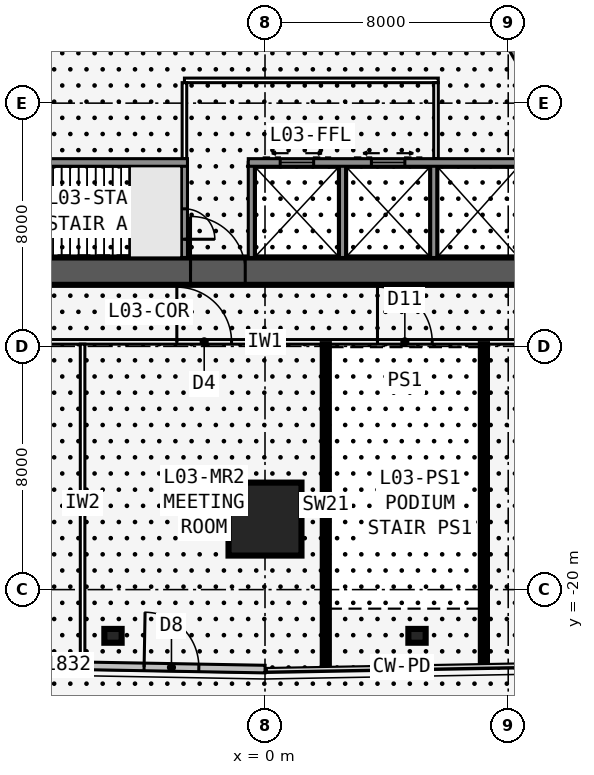
"""IFC4 building model, lengths in metres.
Left out: names, types, materials, properties, quantities, classifications, styles, units other than length and angle.
Written with IfcOpenShell. Run it as: python <this file> out.ifc"""

import sys

from ifc_helpers import new_model, si_unit, direction, frame, frame_2d, origin, origin_2d, place, context, subcontext, project, spatial, rectangle, i_section, extrude, element, fill, save


model = new_model("IFC4")
c1 = context("Model", 3, precision=1e-05, world=origin(), true_north=direction((0.0, 1.0)))
c2 = subcontext(c1, "Body", "Model", "MODEL_VIEW")
j1 = project(units=[si_unit("LENGTHUNIT", "METRE"), si_unit("PLANEANGLEUNIT", "RADIAN")], contexts=[c1])
p1 = place(None, origin())
s1 = spatial("IfcSite", under=j1, at=p1, CompositionType="ELEMENT")
p2 = place(p1, origin())
s2 = spatial("IfcBuilding", under=s1, at=p2, CompositionType="ELEMENT")
p3 = place(p2, frame((0.0, 0.0, 17.5)))
s3 = spatial("IfcBuildingStorey", under=s2, at=p3, CompositionType="ELEMENT", Elevation=17.5)
p4 = place(p3, frame((-16.5, -9.526, 0.0), z_axis=(0.0, 0.0, 1.0), x_axis=(1.0, 0.0, 0.0)))
e1 = element("IfcWall", 1, at=p4, inside=s3, PredefinedType="SHEAR", context=c2, shape_type="SweptSolid", body=[
    extrude(rectangle(XDim=33.0, YDim=0.9, at=frame_2d((16.5, 0.0))), origin(), (0.0, 0.0, 1.0), 5.0),
])
p5 = place(p4, frame((14.05, 0.0, 0.0)))
e2 = element("IfcOpeningElement", 2, at=p5, cuts=e1, PredefinedType="OPENING", context=c2, shape_type="SweptSolid", body=[
    extrude(rectangle(XDim=1.8, YDim=2.13, at=frame_2d((0.9, 1.065))), frame((0.0, 0.46, 0.0), z_axis=(0.0, -1.0, 0.0), x_axis=(1.0, 0.0, 0.0)), (0.0, 0.0, 1.0), 0.92),
])
p6 = place(p3, frame((-10.183, -5.951, 0.0), z_axis=(0.0, 0.0, 1.0), x_axis=(1.0, 0.0, 0.0)))
e3 = element("IfcWall", 3, at=p6, inside=s3, PredefinedType="SOLIDWALL", context=c2, shape_type="SweptSolid", body=[
    extrude(rectangle(XDim=7.633, YDim=0.25, at=frame_2d((3.816, 0.0))), origin(), (0.0, 0.0, 1.0), 4.75),
])
p7 = place(p3, frame((-0.55, -5.951, 0.0), z_axis=(0.0, 0.0, 1.0), x_axis=(1.0, 0.0, 0.0)))
e4 = element("IfcWall", 4, at=p7, inside=s3, PredefinedType="SOLIDWALL", context=c2, shape_type="SweptSolid", body=[
    extrude(rectangle(XDim=10.733, YDim=0.25, at=frame_2d((5.366, 0.0))), origin(), (0.0, 0.0, 1.0), 4.75),
])
p8 = place(p7, frame((9.314, 0.0, 0.0)))
e5 = element("IfcOpeningElement", 5, at=p8, cuts=e4, PredefinedType="OPENING", context=c2, shape_type="SweptSolid", body=[
    extrude(rectangle(XDim=0.9, YDim=2.13, at=frame_2d((0.45, 1.065))), frame((0.0, 0.135, 0.0), z_axis=(0.0, -1.0, 0.0), x_axis=(1.0, 0.0, 0.0)), (0.0, 0.0, 1.0), 0.27),
])
p9 = place(p7, frame((1.05, 0.0, 0.0)))
e6 = element("IfcOpeningElement", 6, at=p9, cuts=e4, PredefinedType="OPENING", context=c2, shape_type="SweptSolid", body=[
    extrude(rectangle(XDim=1.1, YDim=2.13, at=frame_2d((0.55, 1.065))), frame((0.0, 0.135, 0.0), z_axis=(0.0, -1.0, 0.0), x_axis=(1.0, 0.0, 0.0)), (0.0, 0.0, 1.0), 0.27),
])
p10 = place(p7, frame((4.05, 0.0, 0.0)))
e7 = element("IfcOpeningElement", 7, at=p10, cuts=e4, PredefinedType="OPENING", context=c2, shape_type="SweptSolid", body=[
    extrude(rectangle(XDim=1.1, YDim=2.13, at=frame_2d((0.55, 1.065))), frame((0.0, 0.135, 0.0), z_axis=(0.0, -1.0, 0.0), x_axis=(1.0, 0.0, 0.0)), (0.0, 0.0, 1.0), 0.27),
])
p11 = place(p3, frame((-2.65, -5.951, 0.0), z_axis=(0.0, 0.0, 1.0), x_axis=(0.0, -1.0, 0.0)))
e8 = element("IfcWall", 8, at=p11, inside=s3, PredefinedType="SOLIDWALL", context=c2, shape_type="SweptSolid", body=[
    extrude(rectangle(XDim=3.125, YDim=0.2, at=frame_2d((1.562, 0.0))), origin(), (0.0, 0.0, 1.0), 4.75),
])
p12 = place(p11, frame((1.525, 0.0, 0.0)))
e9 = element("IfcOpeningElement", 9, at=p12, cuts=e8, PredefinedType="OPENING", context=c2, shape_type="SweptSolid", body=[
    extrude(rectangle(XDim=1.0, YDim=2.13, at=frame_2d((0.5, 1.065))), frame((0.0, 0.11, 0.0), z_axis=(0.0, -1.0, 0.0), x_axis=(1.0, 0.0, 0.0)), (0.0, 0.0, 1.0), 0.22),
])
for number, where, z_axis, x_axis in (
    (10, (-0.45, -5.951, 0.0), (0.0, 0.0, 1.0), (0.0, -1.0, 0.0)),
    (11, (2.55, -5.951, 0.0), (0.0, 0.0, 1.0), (0.0, -1.0, 0.0)),
    (12, (5.55, -5.951, 0.0), (0.0, 0.0, 1.0), (0.0, -1.0, 0.0)),
):
    element("IfcWall", number, at=place(p3, frame(where, z_axis=z_axis, x_axis=x_axis)), inside=s3, PredefinedType="SOLIDWALL", context=c2, shape_type="SweptSolid", body=[
        extrude(rectangle(XDim=3.125, YDim=0.2, at=frame_2d((1.562, 0.0))), origin(), (0.0, 0.0, 1.0), 4.75),
    ])
p13 = place(p3, frame((16.5, -9.526, 0.0), z_axis=(0.0, 0.0, 1.0), x_axis=(-0.499999749417, 0.866025548458, 0.0)))
e13 = element("IfcWall", 13, at=p13, inside=s3, PredefinedType="SHEAR", context=c2, shape_type="SweptSolid", body=[
    extrude(rectangle(XDim=33.0, YDim=0.9, at=frame_2d((16.5, 0.0))), origin(), (0.0, 0.0, 1.0), 5.0),
])
p14 = place(p13, frame((14.15, 0.0, 0.0)))
e14 = element("IfcOpeningElement", 14, at=p14, cuts=e13, PredefinedType="OPENING", context=c2, shape_type="SweptSolid", body=[
    extrude(rectangle(XDim=1.8, YDim=2.13, at=frame_2d((0.9, 1.065))), frame((0.0, 0.46, 0.0), z_axis=(0.0, -1.0, 0.0), x_axis=(1.0, 0.0, 0.0)), (0.0, 0.0, 1.0), 0.92),
])
p15 = place(p13, frame((12.6, 0.0, 0.0)))
e15 = element("IfcOpeningElement", 15, at=p15, cuts=e13, PredefinedType="OPENING", context=c2, shape_type="SweptSolid", body=[
    extrude(rectangle(XDim=1.0, YDim=2.13, at=frame_2d((0.5, 1.065))), frame((0.0, 0.46, 0.0), z_axis=(0.0, -1.0, 0.0), x_axis=(1.0, 0.0, 0.0)), (0.0, 0.0, 1.0), 0.92),
])
p16 = place(p3, frame((10.245, -5.843, 0.0), z_axis=(0.0, 0.0, 1.0), x_axis=(-0.499993009313, 0.866029439822, 0.0)))
e16 = element("IfcWall", 16, at=p16, inside=s3, PredefinedType="SOLIDWALL", context=c2, shape_type="SweptSolid", body=[
    extrude(rectangle(XDim=7.733, YDim=0.25, at=frame_2d((3.866, 0.0))), origin(), (0.0, 0.0, 1.0), 4.75),
])
p17 = place(p3, frame((0.0, 19.052, 0.0), z_axis=(0.0, 0.0, 1.0), x_axis=(-0.499999749417, -0.866025548458, 0.0)))
e17 = element("IfcWall", 17, at=p17, inside=s3, PredefinedType="SHEAR", context=c2, shape_type="SweptSolid", body=[
    extrude(rectangle(XDim=33.0, YDim=0.9, at=frame_2d((16.5, 0.0))), origin(), (0.0, 0.0, 1.0), 5.0),
])
p18 = place(p17, frame((14.15, 0.0, 0.0)))
e18 = element("IfcOpeningElement", 18, at=p18, cuts=e17, PredefinedType="OPENING", context=c2, shape_type="SweptSolid", body=[
    extrude(rectangle(XDim=1.8, YDim=2.13, at=frame_2d((0.9, 1.065))), frame((0.0, 0.46, 0.0), z_axis=(0.0, -1.0, 0.0), x_axis=(1.0, 0.0, 0.0)), (0.0, 0.0, 1.0), 0.92),
])
p19 = place(p17, frame((12.6, 0.0, 0.0)))
e19 = element("IfcOpeningElement", 19, at=p19, cuts=e17, PredefinedType="OPENING", context=c2, shape_type="SweptSolid", body=[
    extrude(rectangle(XDim=1.0, YDim=2.13, at=frame_2d((0.5, 1.065))), frame((0.0, 0.46, 0.0), z_axis=(0.0, -1.0, 0.0), x_axis=(1.0, 0.0, 0.0)), (0.0, 0.0, 1.0), 0.92),
])
p20 = place(p3, frame((-4.929, 3.365, 0.0), z_axis=(0.0, 0.0, 1.0), x_axis=(-0.499991433582, -0.866030349552, 0.0)))
e20 = element("IfcWall", 20, at=p20, inside=s3, PredefinedType="SOLIDWALL", context=c2, shape_type="SweptSolid", body=[
    extrude(rectangle(XDim=10.633, YDim=0.25, at=frame_2d((5.316, 0.0))), origin(), (0.0, 0.0, 1.0), 4.75),
])
p21 = place(p20, frame((9.164, 0.0, 0.0)))
e21 = element("IfcOpeningElement", 21, at=p21, cuts=e20, PredefinedType="OPENING", context=c2, shape_type="SweptSolid", body=[
    extrude(rectangle(XDim=0.9, YDim=2.13, at=frame_2d((0.45, 1.065))), frame((0.0, 0.135, 0.0), z_axis=(0.0, -1.0, 0.0), x_axis=(1.0, 0.0, 0.0)), (0.0, 0.0, 1.0), 0.27),
])
for number, where, z_axis, x_axis in (
    (22, (-5.0, -21.521, 0.0), (0.0, 0.0, 1.0), (0.0, -1.0, 0.0)),
    (23, (5.0, -21.521, 0.0), (0.0, 0.0, 1.0), (0.0, -1.0, 0.0)),
):
    element("IfcColumn", number, at=place(p3, frame(where, z_axis=z_axis, x_axis=x_axis)), inside=s3, PredefinedType="COLUMN", context=c2, shape_type="SweptSolid", body=[
        extrude(i_section(OverallWidth=0.455, OverallDepth=0.569, WebThickness=0.078, FlangeThickness=0.125, at=origin_2d()), origin(), (0.0, 0.0, 1.0), 5.0),
    ])
p22 = place(p3, frame((0.0, -17.68, 0.0), z_axis=(0.0, 0.0, 1.0), x_axis=(0.0, -1.0, 0.0)))
e24 = element("IfcColumn", 24, at=p22, inside=s3, PredefinedType="COLUMN", context=c2, shape_type="SweptSolid", body=[
    extrude(rectangle(XDim=2.4, YDim=2.4, at=origin_2d()), origin(), (0.0, 0.0, 1.0), 5.0),
])
p23 = place(p3, frame((-8.998, -22.452, 0.0), z_axis=(0.0, 0.0, 1.0), x_axis=(0.999838308644, -0.017982118018, 0.0)))
e25 = element("IfcWall", 25, at=p23, inside=s3, PredefinedType="STANDARD", context=c2, shape_type="SweptSolid", body=[
    extrude(rectangle(XDim=9.001, YDim=0.25, at=frame_2d((4.501, 0.0))), origin(), (0.0, 0.0, 1.0), 4.75),
])
p24 = place(p23, frame((0.671, 0.0, 0.6)))
e26 = element("IfcOpeningElement", 26, at=p24, cuts=e25, PredefinedType="OPENING", context=c2, shape_type="SweptSolid", body=[
    extrude(rectangle(XDim=1.8, YDim=3.2, at=frame_2d((0.9, 1.6))), frame((0.0, 0.135, 0.0), z_axis=(0.0, -1.0, 0.0), x_axis=(1.0, 0.0, 0.0)), (0.0, 0.0, 1.0), 0.27),
])
p25 = place(p23, frame((5.022, 0.0, 0.0)))
e27 = element("IfcOpeningElement", 27, at=p25, cuts=e25, PredefinedType="OPENING", context=c2, shape_type="SweptSolid", body=[
    extrude(rectangle(XDim=1.8, YDim=2.4, at=frame_2d((0.9, 1.2))), frame((0.0, 0.135, 0.0), z_axis=(0.0, -1.0, 0.0), x_axis=(1.0, 0.0, 0.0)), (0.0, 0.0, 1.0), 0.27),
])
p26 = place(p3, frame((-19.527, -11.851, 0.0), z_axis=(0.0, 0.0, 1.0), x_axis=(1.0, 0.0, 0.0)))
e28 = element("IfcWall", 28, at=p26, inside=s3, PredefinedType="PARTITIONING", context=c2, shape_type="SweptSolid", body=[
    extrude(rectangle(XDim=39.054, YDim=0.15, at=frame_2d((19.527, 0.0))), origin(), (0.0, 0.0, 1.0), 4.75),
])
p27 = place(p26, frame((6.013, 0.0, 0.0)))
e29 = element("IfcOpeningElement", 29, at=p27, cuts=e28, PredefinedType="OPENING", context=c2, shape_type="SweptSolid", body=[
    extrude(rectangle(XDim=1.8, YDim=2.13, at=frame_2d((0.9, 1.065))), frame((0.0, 0.085, 0.0), z_axis=(0.0, -1.0, 0.0), x_axis=(1.0, 0.0, 0.0)), (0.0, 0.0, 1.0), 0.17),
])
p28 = place(p26, frame((16.627, 0.0, 0.0)))
e30 = element("IfcOpeningElement", 30, at=p28, cuts=e28, PredefinedType="OPENING", context=c2, shape_type="SweptSolid", body=[
    extrude(rectangle(XDim=1.8, YDim=2.13, at=frame_2d((0.9, 1.065))), frame((0.0, 0.085, 0.0), z_axis=(0.0, -1.0, 0.0), x_axis=(1.0, 0.0, 0.0)), (0.0, 0.0, 1.0), 0.17),
])
p29 = place(p26, frame((23.227, 0.0, 0.0)))
e31 = element("IfcOpeningElement", 31, at=p29, cuts=e28, PredefinedType="OPENING", context=c2, shape_type="SweptSolid", body=[
    extrude(rectangle(XDim=1.8, YDim=2.13, at=frame_2d((0.9, 1.065))), frame((0.0, 0.085, 0.0), z_axis=(0.0, -1.0, 0.0), x_axis=(1.0, 0.0, 0.0)), (0.0, 0.0, 1.0), 0.17),
])
p30 = place(p26, frame((31.841, 0.0, 0.0)))
e32 = element("IfcOpeningElement", 32, at=p30, cuts=e28, PredefinedType="OPENING", context=c2, shape_type="SweptSolid", body=[
    extrude(rectangle(XDim=1.8, YDim=2.13, at=frame_2d((0.9, 1.065))), frame((0.0, 0.085, 0.0), z_axis=(0.0, -1.0, 0.0), x_axis=(1.0, 0.0, 0.0)), (0.0, 0.0, 1.0), 0.17),
])
p31 = place(p3, frame((-6.0, -11.926, 0.0), z_axis=(0.0, 0.0, 1.0), x_axis=(0.0, -1.0, 0.0)))
e33 = element("IfcWall", 33, at=p31, inside=s3, PredefinedType="PARTITIONING", context=c2, shape_type="SweptSolid", body=[
    extrude(rectangle(XDim=10.455, YDim=0.15, at=frame_2d((5.228, 0.0))), origin(), (0.0, 0.0, 1.0), 4.75),
])
p32 = place(p3, frame((2.0, -11.926, 0.0), z_axis=(0.0, 0.0, 1.0), x_axis=(0.0, -1.0, 0.0)))
e34 = element("IfcWall", 34, at=p32, inside=s3, PredefinedType="SHEAR", context=c2, shape_type="SweptSolid", body=[
    extrude(rectangle(XDim=10.596, YDim=0.2, at=frame_2d((5.298, 0.0))), origin(), (0.0, 0.0, 1.0), 5.0),
])
p33 = place(p3, frame((7.2, -11.926, 0.0), z_axis=(0.0, 0.0, 1.0), x_axis=(0.0, -1.0, 0.0)))
e35 = element("IfcWall", 35, at=p33, inside=s3, PredefinedType="SHEAR", context=c2, shape_type="SweptSolid", body=[
    extrude(rectangle(XDim=10.502, YDim=0.2, at=frame_2d((5.251, 0.0))), origin(), (0.0, 0.0, 1.0), 5.0),
])
p34 = place(p3, frame((20.027, -10.985, 0.0), z_axis=(0.0, 0.0, 1.0), x_axis=(-0.500001677587, 0.866024435227, 0.0)))
e36 = element("IfcWall", 36, at=p34, inside=s3, PredefinedType="PARTITIONING", context=c2, shape_type="SweptSolid", body=[
    extrude(rectangle(XDim=39.054, YDim=0.15, at=frame_2d((19.527, 0.0))), origin(), (0.0, 0.0, 1.0), 4.75),
])
p35 = place(p34, frame((10.013, 0.0, 0.0)))
e37 = element("IfcOpeningElement", 37, at=p35, cuts=e36, PredefinedType="OPENING", context=c2, shape_type="SweptSolid", body=[
    extrude(rectangle(XDim=1.8, YDim=2.13, at=frame_2d((0.9, 1.065))), frame((0.0, 0.085, 0.0), z_axis=(0.0, -1.0, 0.0), x_axis=(1.0, 0.0, 0.0)), (0.0, 0.0, 1.0), 0.17),
])
p36 = place(p34, frame((23.227, 0.0, 0.0)))
e38 = element("IfcOpeningElement", 38, at=p36, cuts=e36, PredefinedType="OPENING", context=c2, shape_type="SweptSolid", body=[
    extrude(rectangle(XDim=1.8, YDim=2.13, at=frame_2d((0.9, 1.065))), frame((0.0, 0.085, 0.0), z_axis=(0.0, -1.0, 0.0), x_axis=(1.0, 0.0, 0.0)), (0.0, 0.0, 1.0), 0.17),
])
p37 = place(p34, frame((27.627, 0.0, 0.0)))
e39 = element("IfcOpeningElement", 39, at=p37, cuts=e36, PredefinedType="OPENING", context=c2, shape_type="SweptSolid", body=[
    extrude(rectangle(XDim=1.0, YDim=2.13, at=frame_2d((0.5, 1.065))), frame((0.0, 0.085, 0.0), z_axis=(0.0, -1.0, 0.0), x_axis=(1.0, 0.0, 0.0)), (0.0, 0.0, 1.0), 0.17),
])
p38 = place(p34, frame((30.527, 0.0, 0.0)))
e40 = element("IfcOpeningElement", 40, at=p38, cuts=e36, PredefinedType="OPENING", context=c2, shape_type="SweptSolid", body=[
    extrude(rectangle(XDim=1.0, YDim=2.13, at=frame_2d((0.5, 1.065))), frame((0.0, 0.085, 0.0), z_axis=(0.0, -1.0, 0.0), x_axis=(1.0, 0.0, 0.0)), (0.0, 0.0, 1.0), 0.17),
])
p39 = place(p34, frame((33.277, 0.0, 0.0)))
e41 = element("IfcOpeningElement", 41, at=p39, cuts=e36, PredefinedType="OPENING", context=c2, shape_type="SweptSolid", body=[
    extrude(rectangle(XDim=1.0, YDim=2.13, at=frame_2d((0.5, 1.065))), frame((0.0, 0.085, 0.0), z_axis=(0.0, -1.0, 0.0), x_axis=(1.0, 0.0, 0.0)), (0.0, 0.0, 1.0), 0.17),
])
p40 = place(p34, frame((36.39, 0.0, 0.0)))
e42 = element("IfcOpeningElement", 42, at=p40, cuts=e36, PredefinedType="OPENING", context=c2, shape_type="SweptSolid", body=[
    extrude(rectangle(XDim=1.0, YDim=2.13, at=frame_2d((0.5, 1.065))), frame((0.0, 0.085, 0.0), z_axis=(0.0, -1.0, 0.0), x_axis=(1.0, 0.0, 0.0)), (0.0, 0.0, 1.0), 0.17),
])
p41 = place(p3, frame((-0.5, 22.836, 0.0), z_axis=(0.0, 0.0, 1.0), x_axis=(-0.500001677587, -0.866024435227, 0.0)))
e43 = element("IfcWall", 43, at=p41, inside=s3, PredefinedType="PARTITIONING", context=c2, shape_type="SweptSolid", body=[
    extrude(rectangle(XDim=39.054, YDim=0.15, at=frame_2d((19.527, 0.0))), origin(), (0.0, 0.0, 1.0), 4.75),
])
p42 = place(p41, frame((10.414, 0.0, 0.0)))
e44 = element("IfcOpeningElement", 44, at=p42, cuts=e43, PredefinedType="OPENING", context=c2, shape_type="SweptSolid", body=[
    extrude(rectangle(XDim=1.0, YDim=2.13, at=frame_2d((0.5, 1.065))), frame((0.0, 0.085, 0.0), z_axis=(0.0, -1.0, 0.0), x_axis=(1.0, 0.0, 0.0)), (0.0, 0.0, 1.0), 0.17),
])
p43 = place(p41, frame((23.227, 0.0, 0.0)))
e45 = element("IfcOpeningElement", 45, at=p43, cuts=e43, PredefinedType="OPENING", context=c2, shape_type="SweptSolid", body=[
    extrude(rectangle(XDim=1.8, YDim=2.13, at=frame_2d((0.9, 1.065))), frame((0.0, 0.085, 0.0), z_axis=(0.0, -1.0, 0.0), x_axis=(1.0, 0.0, 0.0)), (0.0, 0.0, 1.0), 0.17),
])
p44 = place(p41, frame((27.627, 0.0, 0.0)))
e46 = element("IfcOpeningElement", 46, at=p44, cuts=e43, PredefinedType="OPENING", context=c2, shape_type="SweptSolid", body=[
    extrude(rectangle(XDim=1.0, YDim=2.13, at=frame_2d((0.5, 1.065))), frame((0.0, 0.085, 0.0), z_axis=(0.0, -1.0, 0.0), x_axis=(1.0, 0.0, 0.0)), (0.0, 0.0, 1.0), 0.17),
])
p45 = place(p41, frame((30.277, 0.0, 0.0)))
e47 = element("IfcOpeningElement", 47, at=p45, cuts=e43, PredefinedType="OPENING", context=c2, shape_type="SweptSolid", body=[
    extrude(rectangle(XDim=1.0, YDim=2.13, at=frame_2d((0.5, 1.065))), frame((0.0, 0.085, 0.0), z_axis=(0.0, -1.0, 0.0), x_axis=(1.0, 0.0, 0.0)), (0.0, 0.0, 1.0), 0.17),
])
p46 = place(p41, frame((34.89, 0.0, 0.0)))
e48 = element("IfcOpeningElement", 48, at=p46, cuts=e43, PredefinedType="OPENING", context=c2, shape_type="SweptSolid", body=[
    extrude(rectangle(XDim=1.0, YDim=2.13, at=frame_2d((0.5, 1.065))), frame((0.0, 0.085, 0.0), z_axis=(0.0, -1.0, 0.0), x_axis=(1.0, 0.0, 0.0)), (0.0, 0.0, 1.0), 0.17),
])
p47 = place(p3, frame((-2.65, -3.251, 0.0), z_axis=(0.0, 0.0, 1.0), x_axis=(1.0, 0.0, 0.0)))
e49 = element("IfcWall", 49, at=p47, inside=s3, PredefinedType="PARTITIONING", context=c2, shape_type="SweptSolid", body=[
    extrude(rectangle(XDim=8.35, YDim=0.15, at=frame_2d((4.175, 0.0))), origin(), (0.0, 0.0, 1.0), 4.75),
])
for number, where, z_axis, x_axis in (
    (50, (-2.65, -5.826, 0.0), (0.0, 0.0, 1.0), (0.0, 1.0, 0.0)),
    (51, (5.625, -5.826, 0.0), (0.0, 0.0, 1.0), (0.0, 1.0, 0.0)),
):
    element("IfcWall", number, at=place(p3, frame(where, z_axis=z_axis, x_axis=x_axis)), inside=s3, PredefinedType="PARTITIONING", context=c2, shape_type="SweptSolid", body=[
        extrude(rectangle(XDim=2.5, YDim=0.15, at=frame_2d((1.25, 0.0))), origin(), (0.0, 0.0, 1.0), 4.75),
    ])
p48 = place(p3, frame((-7.247, -7.576, 0.0), z_axis=(0.0, 0.0, 1.0), x_axis=(1.0, 0.0, 0.0)))
e52 = element("IfcWall", 52, at=p48, inside=s3, PredefinedType="SOLIDWALL", context=c2, shape_type="SweptSolid", body=[
    extrude(rectangle(XDim=2.794, YDim=0.1, at=frame_2d((1.397, 0.0))), origin(), (0.0, 0.0, 1.0), 5.0),
])
p49 = place(p24, origin())
e53 = element("IfcWindow", 53, at=p49, inside=s3, PartitioningType="SINGLE_PANEL", PredefinedType="WINDOW", context=c2, shape_type="SweptSolid", body=[
    extrude(rectangle(XDim=1.8, YDim=3.2, at=frame_2d((0.9, 1.6))), frame((0.0, 0.03, 0.0), z_axis=(0.0, -1.0, 0.0), x_axis=(1.0, 0.0, 0.0)), (0.0, 0.0, 1.0), 0.06),
])
fill(e26, e53)
p50 = place(p25, origin())
e54 = element("IfcDoor", 54, at=p50, inside=s3, OperationType="DOUBLE_DOOR_SINGLE_SWING", PredefinedType="DOOR", context=c2, shape_type="SweptSolid", body=[
    extrude(rectangle(XDim=1.8, YDim=2.4, at=frame_2d((0.9, 1.2))), frame((0.0, 0.025, 0.0), z_axis=(0.0, -1.0, 0.0), x_axis=(1.0, 0.0, 0.0)), (0.0, 0.0, 1.0), 0.05),
])
fill(e27, e54)
p51 = place(p28, origin())
e55 = element("IfcDoor", 55, at=p51, inside=s3, OperationType="DOUBLE_DOOR_SINGLE_SWING", PredefinedType="DOOR", context=c2, shape_type="SweptSolid", body=[
    extrude(rectangle(XDim=1.8, YDim=2.13, at=frame_2d((0.9, 1.065))), frame((0.0, 0.025, 0.0), z_axis=(0.0, -1.0, 0.0), x_axis=(1.0, 0.0, 0.0)), (0.0, 0.0, 1.0), 0.05),
])
fill(e30, e55)
p52 = place(p29, origin())
e56 = element("IfcDoor", 56, at=p52, inside=s3, OperationType="DOUBLE_DOOR_SINGLE_SWING", PredefinedType="DOOR", context=c2, shape_type="SweptSolid", body=[
    extrude(rectangle(XDim=1.8, YDim=2.13, at=frame_2d((0.9, 1.065))), frame((0.0, 0.025, 0.0), z_axis=(0.0, -1.0, 0.0), x_axis=(1.0, 0.0, 0.0)), (0.0, 0.0, 1.0), 0.05),
])
fill(e31, e56)
p53 = place(p5, origin())
e57 = element("IfcDoor", 57, at=p53, inside=s3, OperationType="DOUBLE_DOOR_SINGLE_SWING", PredefinedType="DOOR", context=c2, shape_type="SweptSolid", body=[
    extrude(rectangle(XDim=1.8, YDim=2.13, at=frame_2d((0.9, 1.065))), frame((0.0, 0.025, 0.0), z_axis=(0.0, -1.0, 0.0), x_axis=(1.0, 0.0, 0.0)), (0.0, 0.0, 1.0), 0.05),
])
fill(e2, e57)
p54 = place(p12, origin())
e58 = element("IfcDoor", 58, at=p54, inside=s3, OperationType="SINGLE_SWING_RIGHT", PredefinedType="DOOR", context=c2, shape_type="SweptSolid", body=[
    extrude(rectangle(XDim=1.0, YDim=2.13, at=frame_2d((0.5, 1.065))), frame((0.0, 0.025, 0.0), z_axis=(0.0, -1.0, 0.0), x_axis=(1.0, 0.0, 0.0)), (0.0, 0.0, 1.0), 0.05),
])
fill(e9, e58)
p55 = place(p9, origin())
e59 = element("IfcDoor", 59, at=p55, inside=s3, OperationType="DOUBLE_DOOR_SLIDING", PredefinedType="USERDEFINED", context=c2, shape_type="SweptSolid", body=[
    extrude(rectangle(XDim=1.1, YDim=2.13, at=frame_2d((0.55, 1.065))), frame((0.0, 0.025, 0.0), z_axis=(0.0, -1.0, 0.0), x_axis=(1.0, 0.0, 0.0)), (0.0, 0.0, 1.0), 0.05),
])
fill(e6, e59)
p56 = place(p10, origin())
e60 = element("IfcDoor", 60, at=p56, inside=s3, OperationType="DOUBLE_DOOR_SLIDING", PredefinedType="USERDEFINED", context=c2, shape_type="SweptSolid", body=[
    extrude(rectangle(XDim=1.1, YDim=2.13, at=frame_2d((0.55, 1.065))), frame((0.0, 0.025, 0.0), z_axis=(0.0, -1.0, 0.0), x_axis=(1.0, 0.0, 0.0)), (0.0, 0.0, 1.0), 0.05),
])
fill(e7, e60)
save(model, sys.argv[1])
